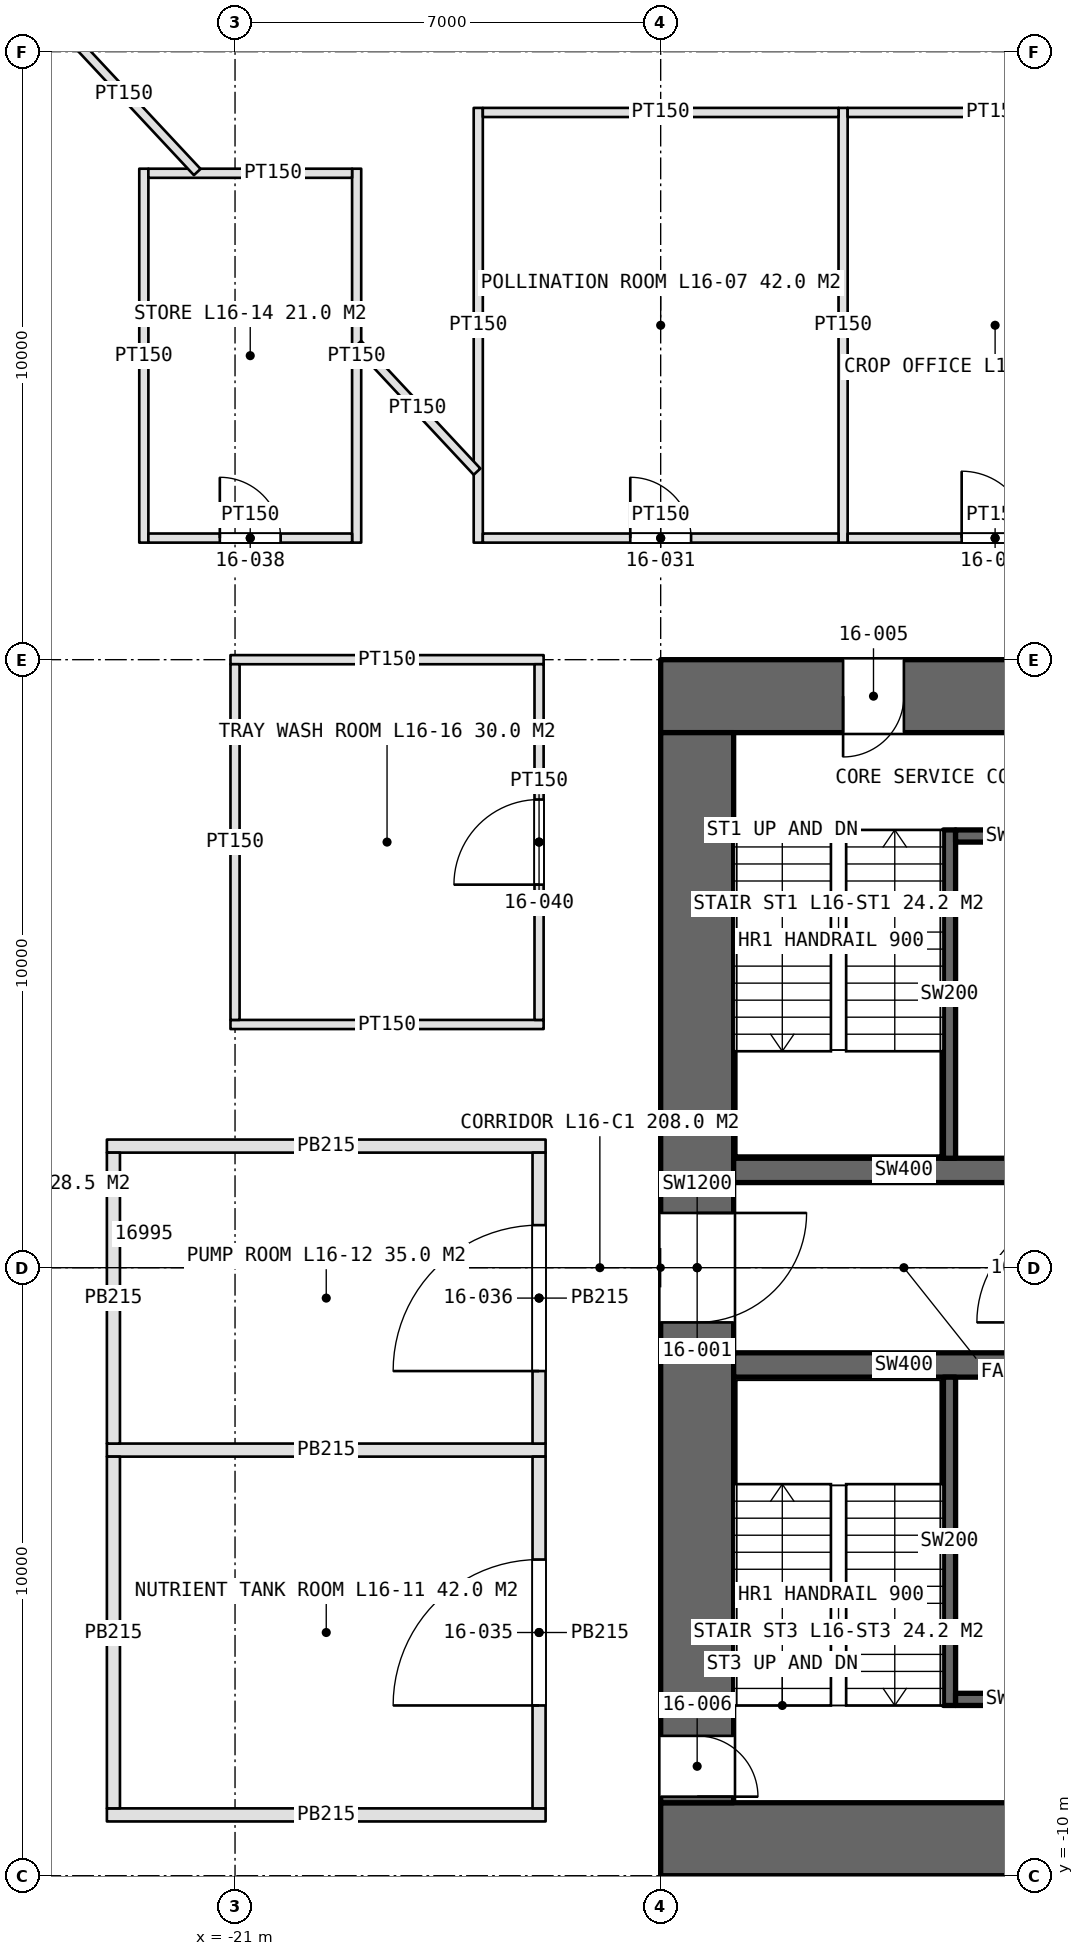
"""IFC4 building model, lengths in metres.
Left out: names, types, materials, properties, quantities, classifications, styles, units other than length and angle.
Written with IfcOpenShell. Run it as: python <this file> out.ifc"""

import sys

from ifc_helpers import new_model, si_unit, direction, frame, frame_2d, origin, place, context, subcontext, project, spatial, rectangle, extrude, element, fill, save


model = new_model("IFC4")
c1 = context("Model", 3, precision=1e-05, world=origin(), true_north=direction((0.0, 1.0)))
c2 = subcontext(c1, "Body", "Model", "MODEL_VIEW")
j1 = project(units=[si_unit("LENGTHUNIT", "METRE"), si_unit("PLANEANGLEUNIT", "RADIAN")], contexts=[c1])
p1 = place(None, origin())
s1 = spatial("IfcSite", under=j1, at=p1, CompositionType="ELEMENT")
p2 = place(p1, origin())
s2 = spatial("IfcBuilding", under=s1, at=p2, CompositionType="ELEMENT")
p3 = place(p2, frame((0.0, 0.0, 80.0)))
s3 = spatial("IfcBuildingStorey", under=s2, at=p3, CompositionType="ELEMENT", Elevation=80.0)
p4 = place(p3, frame((-14.0, -9.4, 0.0), z_axis=(0.0, 0.0, 1.0), x_axis=(1.0, 0.0, 0.0)))
e1 = element("IfcWall", 1, at=p4, inside=s3, PredefinedType="SHEAR", context=c2, shape_type="SweptSolid", body=[
    extrude(rectangle(XDim=28.0, YDim=1.2, at=frame_2d((14.0, 0.0))), origin(), (0.0, 0.0, 1.0), 5.0),
])
p5 = place(p4, frame((13.1, 0.0, 0.0)))
e2 = element("IfcOpeningElement", 2, at=p5, cuts=e1, PredefinedType="OPENING", context=c2, shape_type="SweptSolid", body=[
    extrude(rectangle(XDim=1.8, YDim=2.4, at=frame_2d((0.9, 1.2))), frame((0.0, 0.61, 0.0), z_axis=(0.0, -1.0, 0.0), x_axis=(1.0, 0.0, 0.0)), (0.0, 0.0, 1.0), 1.22),
])
p6 = place(p4, frame((22.9, 0.0, 0.0)))
e3 = element("IfcOpeningElement", 3, at=p6, cuts=e1, PredefinedType="OPENING", context=c2, shape_type="SweptSolid", body=[
    extrude(rectangle(XDim=2.2, YDim=2.7, at=frame_2d((1.1, 1.35))), frame((0.0, 0.61, 0.0), z_axis=(0.0, -1.0, 0.0), x_axis=(1.0, 0.0, 0.0)), (0.0, 0.0, 1.0), 1.22),
])
p7 = place(p3, frame((14.0, 9.4, 0.0), z_axis=(0.0, 0.0, 1.0), x_axis=(-1.0, 0.0, 0.0)))
e4 = element("IfcWall", 4, at=p7, inside=s3, PredefinedType="SHEAR", context=c2, shape_type="SweptSolid", body=[
    extrude(rectangle(XDim=28.0, YDim=1.2, at=frame_2d((14.0, 0.0))), origin(), (0.0, 0.0, 1.0), 5.0),
])
p8 = place(p7, frame((24.0, 0.0, 0.0)))
e5 = element("IfcOpeningElement", 5, at=p8, cuts=e4, PredefinedType="OPENING", context=c2, shape_type="SweptSolid", body=[
    extrude(rectangle(XDim=1.0, YDim=2.4, at=frame_2d((0.5, 1.2))), frame((0.0, 0.61, 0.0), z_axis=(0.0, -1.0, 0.0), x_axis=(1.0, 0.0, 0.0)), (0.0, 0.0, 1.0), 1.22),
])
p9 = place(p7, frame((13.1, 0.0, 0.0)))
e6 = element("IfcOpeningElement", 6, at=p9, cuts=e4, PredefinedType="OPENING", context=c2, shape_type="SweptSolid", body=[
    extrude(rectangle(XDim=1.8, YDim=2.4, at=frame_2d((0.9, 1.2))), frame((0.0, 0.61, 0.0), z_axis=(0.0, -1.0, 0.0), x_axis=(1.0, 0.0, 0.0)), (0.0, 0.0, 1.0), 1.22),
])
p10 = place(p3, frame((-13.4, 8.8, 0.0), z_axis=(0.0, 0.0, 1.0), x_axis=(0.0, -1.0, 0.0)))
e7 = element("IfcWall", 7, at=p10, inside=s3, PredefinedType="SHEAR", context=c2, shape_type="SweptSolid", body=[
    extrude(rectangle(XDim=17.6, YDim=1.2, at=frame_2d((8.8, 0.0))), origin(), (0.0, 0.0, 1.0), 5.0),
])
p11 = place(p10, frame((7.9, 0.0, 0.0)))
e8 = element("IfcOpeningElement", 8, at=p11, cuts=e7, PredefinedType="OPENING", context=c2, shape_type="SweptSolid", body=[
    extrude(rectangle(XDim=1.8, YDim=2.4, at=frame_2d((0.9, 1.2))), frame((0.0, 0.61, 0.0), z_axis=(0.0, -1.0, 0.0), x_axis=(1.0, 0.0, 0.0)), (0.0, 0.0, 1.0), 1.22),
])
p12 = place(p10, frame((16.5, 0.0, 0.0)))
e9 = element("IfcOpeningElement", 9, at=p12, cuts=e7, PredefinedType="OPENING", context=c2, shape_type="SweptSolid", body=[
    extrude(rectangle(XDim=1.0, YDim=2.4, at=frame_2d((0.5, 1.2))), frame((0.0, 0.61, 0.0), z_axis=(0.0, -1.0, 0.0), x_axis=(1.0, 0.0, 0.0)), (0.0, 0.0, 1.0), 1.22),
])
for number, where, z_axis, x_axis in (
    (10, (-12.8, 1.6, 0.0), (0.0, 0.0, 1.0), (1.0, 0.0, 0.0)),
    (11, (-12.8, -1.6, 0.0), (0.0, 0.0, 1.0), (1.0, 0.0, 0.0)),
):
    element("IfcWall", number, at=place(p3, frame(where, z_axis=z_axis, x_axis=x_axis)), inside=s3, PredefinedType="SHEAR", context=c2, shape_type="SweptSolid", body=[
        extrude(rectangle(XDim=5.6, YDim=0.4, at=frame_2d((2.8, 0.0))), origin(), (0.0, 0.0, 1.0), 5.0),
    ])
p13 = place(p3, frame((-9.25, 7.2, 0.0), z_axis=(0.0, 0.0, 1.0), x_axis=(0.0, -1.0, 0.0)))
e12 = element("IfcWall", 12, at=p13, inside=s3, PredefinedType="SOLIDWALL", context=c2, shape_type="SweptSolid", body=[
    extrude(rectangle(XDim=5.4, YDim=0.2, at=frame_2d((2.7, 0.0))), origin(), (0.0, 0.0, 1.0), 5.0),
])
p14 = place(p3, frame((-9.15, 7.1, 0.0), z_axis=(0.0, 0.0, 1.0), x_axis=(1.0, 0.0, 0.0)))
e13 = element("IfcWall", 13, at=p14, inside=s3, PredefinedType="SOLIDWALL", context=c2, shape_type="SweptSolid", body=[
    extrude(rectangle(XDim=1.95, YDim=0.2, at=frame_2d((0.975, 0.0))), origin(), (0.0, 0.0, 1.0), 5.0),
])
p15 = place(p3, frame((-9.25, -7.2, 0.0), z_axis=(0.0, 0.0, 1.0), x_axis=(0.0, 1.0, 0.0)))
e14 = element("IfcWall", 14, at=p15, inside=s3, PredefinedType="SOLIDWALL", context=c2, shape_type="SweptSolid", body=[
    extrude(rectangle(XDim=5.4, YDim=0.2, at=frame_2d((2.7, 0.0))), origin(), (0.0, 0.0, 1.0), 5.0),
])
p16 = place(p3, frame((-9.15, -7.1, 0.0), z_axis=(0.0, 0.0, 1.0), x_axis=(1.0, 0.0, 0.0)))
e15 = element("IfcWall", 15, at=p16, inside=s3, PredefinedType="SOLIDWALL", context=c2, shape_type="SweptSolid", body=[
    extrude(rectangle(XDim=1.95, YDim=0.2, at=frame_2d((0.975, 0.0))), origin(), (0.0, 0.0, 1.0), 5.0),
])
for number, where, z_axis, x_axis in (
    (16, (-17.0, 11.925, 0.0), (0.0, 0.0, 1.0), (0.0, 1.0, 0.0)),
    (17, (-11.0, 11.925, 0.0), (0.0, 0.0, 1.0), (0.0, 1.0, 0.0)),
):
    element("IfcWall", number, at=place(p3, frame(where, z_axis=z_axis, x_axis=x_axis)), inside=s3, PredefinedType="PARTITIONING", context=c2, shape_type="SweptSolid", body=[
        extrude(rectangle(XDim=7.15, YDim=0.15, at=frame_2d((3.575, 0.0))), origin(), (0.0, 0.0, 1.0), 3.6),
    ])
p17 = place(p3, frame((-16.925, 12.0, 0.0), z_axis=(0.0, 0.0, 1.0), x_axis=(1.0, 0.0, 0.0)))
e18 = element("IfcWall", 18, at=p17, inside=s3, PredefinedType="PARTITIONING", context=c2, shape_type="SweptSolid", body=[
    extrude(rectangle(XDim=5.85, YDim=0.15, at=frame_2d((2.925, 0.0))), origin(), (0.0, 0.0, 1.0), 3.6),
])
p18 = place(p17, frame((2.425, 0.0, 0.0)))
e19 = element("IfcOpeningElement", 19, at=p18, cuts=e18, PredefinedType="OPENING", context=c2, shape_type="SweptSolid", body=[
    extrude(rectangle(XDim=1.0, YDim=2.2, at=frame_2d((0.5, 1.1))), frame((0.0, 0.085, 0.0), z_axis=(0.0, -1.0, 0.0), x_axis=(1.0, 0.0, 0.0)), (0.0, 0.0, 1.0), 0.17),
])
p19 = place(p3, frame((-16.925, 19.0, 0.0), z_axis=(0.0, 0.0, 1.0), x_axis=(1.0, 0.0, 0.0)))
e20 = element("IfcWall", 20, at=p19, inside=s3, PredefinedType="PARTITIONING", context=c2, shape_type="SweptSolid", body=[
    extrude(rectangle(XDim=5.85, YDim=0.15, at=frame_2d((2.925, 0.0))), origin(), (0.0, 0.0, 1.0), 3.6),
])
p20 = place(p3, frame((-10.925, 12.0, 0.0), z_axis=(0.0, 0.0, 1.0), x_axis=(1.0, 0.0, 0.0)))
e21 = element("IfcWall", 21, at=p20, inside=s3, PredefinedType="PARTITIONING", context=c2, shape_type="SweptSolid", body=[
    extrude(rectangle(XDim=4.85, YDim=0.15, at=frame_2d((2.425, 0.0))), origin(), (0.0, 0.0, 1.0), 3.6),
])
p21 = place(p20, frame((1.875, 0.0, 0.0)))
e22 = element("IfcOpeningElement", 22, at=p21, cuts=e21, PredefinedType="OPENING", context=c2, shape_type="SweptSolid", body=[
    extrude(rectangle(XDim=1.1, YDim=2.3, at=frame_2d((0.55, 1.15))), frame((0.0, 0.085, 0.0), z_axis=(0.0, -1.0, 0.0), x_axis=(1.0, 0.0, 0.0)), (0.0, 0.0, 1.0), 0.17),
])
p22 = place(p3, frame((-10.925, 19.0, 0.0), z_axis=(0.0, 0.0, 1.0), x_axis=(1.0, 0.0, 0.0)))
e23 = element("IfcWall", 23, at=p22, inside=s3, PredefinedType="PARTITIONING", context=c2, shape_type="SweptSolid", body=[
    extrude(rectangle(XDim=4.85, YDim=0.15, at=frame_2d((2.425, 0.0))), origin(), (0.0, 0.0, 1.0), 3.6),
])
for number, where, z_axis, x_axis in (
    (24, (-15.893, -9.0, 0.0), (0.0, 0.0, 1.0), (-1.0, 0.0, 0.0)),
    (25, (-15.893, -3.0, 0.0), (0.0, 0.0, 1.0), (-1.0, 0.0, 0.0)),
    (26, (-15.893, 2.0, 0.0), (0.0, 0.0, 1.0), (-1.0, 0.0, 0.0)),
):
    element("IfcWall", number, at=place(p3, frame(where, z_axis=z_axis, x_axis=x_axis)), inside=s3, PredefinedType="PARTITIONING", context=c2, shape_type="SweptSolid", body=[
        extrude(rectangle(XDim=7.215, YDim=0.215, at=frame_2d((3.607, 0.0))), origin(), (0.0, 0.0, 1.0), 3.6),
    ])
p23 = place(p3, frame((-16.0, -8.893, 0.0), z_axis=(0.0, 0.0, 1.0), x_axis=(0.0, 1.0, 0.0)))
e27 = element("IfcWall", 27, at=p23, inside=s3, PredefinedType="PARTITIONING", context=c2, shape_type="SweptSolid", body=[
    extrude(rectangle(XDim=5.785, YDim=0.215, at=frame_2d((2.893, 0.0))), origin(), (0.0, 0.0, 1.0), 3.6),
])
p24 = place(p23, frame((1.692, 0.0, 0.0)))
e28 = element("IfcOpeningElement", 28, at=p24, cuts=e27, PredefinedType="OPENING", context=c2, shape_type="SweptSolid", body=[
    extrude(rectangle(XDim=2.4, YDim=2.4, at=frame_2d((1.2, 1.2))), frame((0.0, 0.118, 0.0), z_axis=(0.0, -1.0, 0.0), x_axis=(1.0, 0.0, 0.0)), (0.0, 0.0, 1.0), 0.235),
])
p25 = place(p3, frame((-23.0, -8.893, 0.0), z_axis=(0.0, 0.0, 1.0), x_axis=(0.0, 1.0, 0.0)))
e29 = element("IfcWall", 29, at=p25, inside=s3, PredefinedType="PARTITIONING", context=c2, shape_type="SweptSolid", body=[
    extrude(rectangle(XDim=5.785, YDim=0.215, at=frame_2d((2.893, 0.0))), origin(), (0.0, 0.0, 1.0), 3.6),
])
p26 = place(p3, frame((-16.0, -2.893, 0.0), z_axis=(0.0, 0.0, 1.0), x_axis=(0.0, 1.0, 0.0)))
e30 = element("IfcWall", 30, at=p26, inside=s3, PredefinedType="PARTITIONING", context=c2, shape_type="SweptSolid", body=[
    extrude(rectangle(XDim=4.785, YDim=0.215, at=frame_2d((2.393, 0.0))), origin(), (0.0, 0.0, 1.0), 3.6),
])
p27 = place(p26, frame((1.192, 0.0, 0.0)))
e31 = element("IfcOpeningElement", 31, at=p27, cuts=e30, PredefinedType="OPENING", context=c2, shape_type="SweptSolid", body=[
    extrude(rectangle(XDim=2.4, YDim=2.4, at=frame_2d((1.2, 1.2))), frame((0.0, 0.118, 0.0), z_axis=(0.0, -1.0, 0.0), x_axis=(1.0, 0.0, 0.0)), (0.0, 0.0, 1.0), 0.235),
])
p28 = place(p3, frame((-23.0, -2.893, 0.0), z_axis=(0.0, 0.0, 1.0), x_axis=(0.0, 1.0, 0.0)))
e32 = element("IfcWall", 32, at=p28, inside=s3, PredefinedType="PARTITIONING", context=c2, shape_type="SweptSolid", body=[
    extrude(rectangle(XDim=4.785, YDim=0.215, at=frame_2d((2.393, 0.0))), origin(), (0.0, 0.0, 1.0), 3.6),
])
for number, where, z_axis, x_axis in (
    (33, (-22.5, 11.925, 0.0), (0.0, 0.0, 1.0), (0.0, 1.0, 0.0)),
    (34, (-19.0, 11.925, 0.0), (0.0, 0.0, 1.0), (0.0, 1.0, 0.0)),
):
    element("IfcWall", number, at=place(p3, frame(where, z_axis=z_axis, x_axis=x_axis)), inside=s3, PredefinedType="PARTITIONING", context=c2, shape_type="SweptSolid", body=[
        extrude(rectangle(XDim=6.15, YDim=0.15, at=frame_2d((3.075, 0.0))), origin(), (0.0, 0.0, 1.0), 3.6),
    ])
p29 = place(p3, frame((-22.425, 12.0, 0.0), z_axis=(0.0, 0.0, 1.0), x_axis=(1.0, 0.0, 0.0)))
e35 = element("IfcWall", 35, at=p29, inside=s3, PredefinedType="PARTITIONING", context=c2, shape_type="SweptSolid", body=[
    extrude(rectangle(XDim=3.35, YDim=0.15, at=frame_2d((1.675, 0.0))), origin(), (0.0, 0.0, 1.0), 3.6),
])
p30 = place(p29, frame((1.175, 0.0, 0.0)))
e36 = element("IfcOpeningElement", 36, at=p30, cuts=e35, PredefinedType="OPENING", context=c2, shape_type="SweptSolid", body=[
    extrude(rectangle(XDim=1.0, YDim=2.2, at=frame_2d((0.5, 1.1))), frame((0.0, 0.085, 0.0), z_axis=(0.0, -1.0, 0.0), x_axis=(1.0, 0.0, 0.0)), (0.0, 0.0, 1.0), 0.17),
])
p31 = place(p3, frame((-22.425, 18.0, 0.0), z_axis=(0.0, 0.0, 1.0), x_axis=(1.0, 0.0, 0.0)))
e37 = element("IfcWall", 37, at=p31, inside=s3, PredefinedType="PARTITIONING", context=c2, shape_type="SweptSolid", body=[
    extrude(rectangle(XDim=3.35, YDim=0.15, at=frame_2d((1.675, 0.0))), origin(), (0.0, 0.0, 1.0), 3.6),
])
for number, where, z_axis, x_axis in (
    (38, (-15.925, 4.0, 0.0), (0.0, 0.0, 1.0), (-1.0, 0.0, 0.0)),
    (39, (-15.925, 10.0, 0.0), (0.0, 0.0, 1.0), (-1.0, 0.0, 0.0)),
):
    element("IfcWall", number, at=place(p3, frame(where, z_axis=z_axis, x_axis=x_axis)), inside=s3, PredefinedType="PARTITIONING", context=c2, shape_type="SweptSolid", body=[
        extrude(rectangle(XDim=5.15, YDim=0.15, at=frame_2d((2.575, 0.0))), origin(), (0.0, 0.0, 1.0), 3.6),
    ])
p32 = place(p3, frame((-16.0, 4.075, 0.0), z_axis=(0.0, 0.0, 1.0), x_axis=(0.0, 1.0, 0.0)))
e40 = element("IfcWall", 40, at=p32, inside=s3, PredefinedType="PARTITIONING", context=c2, shape_type="SweptSolid", body=[
    extrude(rectangle(XDim=5.85, YDim=0.15, at=frame_2d((2.925, 0.0))), origin(), (0.0, 0.0, 1.0), 3.6),
])
p33 = place(p32, frame((2.225, 0.0, 0.0)))
e41 = element("IfcOpeningElement", 41, at=p33, cuts=e40, PredefinedType="OPENING", context=c2, shape_type="SweptSolid", body=[
    extrude(rectangle(XDim=1.4, YDim=2.4, at=frame_2d((0.7, 1.2))), frame((0.0, 0.085, 0.0), z_axis=(0.0, -1.0, 0.0), x_axis=(1.0, 0.0, 0.0)), (0.0, 0.0, 1.0), 0.17),
])
p34 = place(p3, frame((-21.0, 4.075, 0.0), z_axis=(0.0, 0.0, 1.0), x_axis=(0.0, 1.0, 0.0)))
e42 = element("IfcWall", 42, at=p34, inside=s3, PredefinedType="PARTITIONING", context=c2, shape_type="SweptSolid", body=[
    extrude(rectangle(XDim=5.85, YDim=0.15, at=frame_2d((2.925, 0.0))), origin(), (0.0, 0.0, 1.0), 3.6),
])
p35 = place(p3, frame((-21.622, 18.02, 0.0), z_axis=(0.0, 0.0, 1.0), x_axis=(-0.682522451791, 0.730864626864, 0.0)))
e43 = element("IfcWall", 43, at=p35, inside=s3, PredefinedType="PARTITIONING", context=c2, shape_type="SweptSolid", body=[
    extrude(rectangle(XDim=3.535, YDim=0.15, at=frame_2d((1.768, 0.0))), origin(), (0.0, 0.0, 1.0), 3.6),
])
p36 = place(p3, frame((-17.02, 13.092, 0.0), z_axis=(0.0, 0.0, 1.0), x_axis=(-0.682506029746, 0.730879962347, 0.0)))
e44 = element("IfcWall", 44, at=p36, inside=s3, PredefinedType="PARTITIONING", context=c2, shape_type="SweptSolid", body=[
    extrude(rectangle(XDim=2.872, YDim=0.15, at=frame_2d((1.436, 0.0))), origin(), (0.0, 0.0, 1.0), 3.6),
])
p37 = place(p11, origin())
e45 = element("IfcDoor", 45, at=p37, inside=s3, OperationType="DOUBLE_DOOR_SINGLE_SWING", PredefinedType="DOOR", context=c2, shape_type="SweptSolid", body=[
    extrude(rectangle(XDim=1.8, YDim=2.4, at=frame_2d((0.9, 1.2))), frame((0.0, 0.025, 0.0), z_axis=(0.0, -1.0, 0.0), x_axis=(1.0, 0.0, 0.0)), (0.0, 0.0, 1.0), 0.05),
])
fill(e8, e45)
p38 = place(p8, origin())
e46 = element("IfcDoor", 46, at=p38, inside=s3, OperationType="SINGLE_SWING_RIGHT", PredefinedType="DOOR", context=c2, shape_type="SweptSolid", body=[
    extrude(rectangle(XDim=1.0, YDim=2.4, at=frame_2d((0.5, 1.2))), frame((0.0, 0.025, 0.0), z_axis=(0.0, -1.0, 0.0), x_axis=(1.0, 0.0, 0.0)), (0.0, 0.0, 1.0), 0.05),
])
fill(e5, e46)
p39 = place(p12, origin())
e47 = element("IfcDoor", 47, at=p39, inside=s3, OperationType="SINGLE_SWING_RIGHT", PredefinedType="DOOR", context=c2, shape_type="SweptSolid", body=[
    extrude(rectangle(XDim=1.0, YDim=2.4, at=frame_2d((0.5, 1.2))), frame((0.0, 0.025, 0.0), z_axis=(0.0, -1.0, 0.0), x_axis=(1.0, 0.0, 0.0)), (0.0, 0.0, 1.0), 0.05),
])
fill(e9, e47)
p40 = place(p18, origin())
e48 = element("IfcDoor", 48, at=p40, inside=s3, OperationType="SINGLE_SWING_LEFT", PredefinedType="DOOR", context=c2, shape_type="SweptSolid", body=[
    extrude(rectangle(XDim=1.0, YDim=2.2, at=frame_2d((0.5, 1.1))), frame((0.0, 0.025, 0.0), z_axis=(0.0, -1.0, 0.0), x_axis=(1.0, 0.0, 0.0)), (0.0, 0.0, 1.0), 0.05),
])
fill(e19, e48)
p41 = place(p21, origin())
e49 = element("IfcDoor", 49, at=p41, inside=s3, OperationType="SINGLE_SWING_LEFT", PredefinedType="DOOR", context=c2, shape_type="SweptSolid", body=[
    extrude(rectangle(XDim=1.1, YDim=2.3, at=frame_2d((0.55, 1.15))), frame((0.0, 0.025, 0.0), z_axis=(0.0, -1.0, 0.0), x_axis=(1.0, 0.0, 0.0)), (0.0, 0.0, 1.0), 0.05),
])
fill(e22, e49)
p42 = place(p24, origin())
e50 = element("IfcDoor", 50, at=p42, inside=s3, OperationType="DOUBLE_DOOR_SINGLE_SWING", PredefinedType="DOOR", context=c2, shape_type="SweptSolid", body=[
    extrude(rectangle(XDim=2.4, YDim=2.4, at=frame_2d((1.2, 1.2))), frame((0.0, 0.025, 0.0), z_axis=(0.0, -1.0, 0.0), x_axis=(1.0, 0.0, 0.0)), (0.0, 0.0, 1.0), 0.05),
])
fill(e28, e50)
p43 = place(p27, origin())
e51 = element("IfcDoor", 51, at=p43, inside=s3, OperationType="DOUBLE_DOOR_SINGLE_SWING", PredefinedType="DOOR", context=c2, shape_type="SweptSolid", body=[
    extrude(rectangle(XDim=2.4, YDim=2.4, at=frame_2d((1.2, 1.2))), frame((0.0, 0.025, 0.0), z_axis=(0.0, -1.0, 0.0), x_axis=(1.0, 0.0, 0.0)), (0.0, 0.0, 1.0), 0.05),
])
fill(e31, e51)
p44 = place(p30, origin())
e52 = element("IfcDoor", 52, at=p44, inside=s3, OperationType="SINGLE_SWING_LEFT", PredefinedType="DOOR", context=c2, shape_type="SweptSolid", body=[
    extrude(rectangle(XDim=1.0, YDim=2.2, at=frame_2d((0.5, 1.1))), frame((0.0, 0.025, 0.0), z_axis=(0.0, -1.0, 0.0), x_axis=(1.0, 0.0, 0.0)), (0.0, 0.0, 1.0), 0.05),
])
fill(e36, e52)
p45 = place(p33, origin())
e53 = element("IfcDoor", 53, at=p45, inside=s3, OperationType="DOUBLE_DOOR_DOUBLE_SWING", PredefinedType="DOOR", context=c2, shape_type="SweptSolid", body=[
    extrude(rectangle(XDim=1.4, YDim=2.4, at=frame_2d((0.7, 1.2))), frame((0.0, 0.025, 0.0), z_axis=(0.0, -1.0, 0.0), x_axis=(1.0, 0.0, 0.0)), (0.0, 0.0, 1.0), 0.05),
])
fill(e41, e53)
save(model, sys.argv[1])
